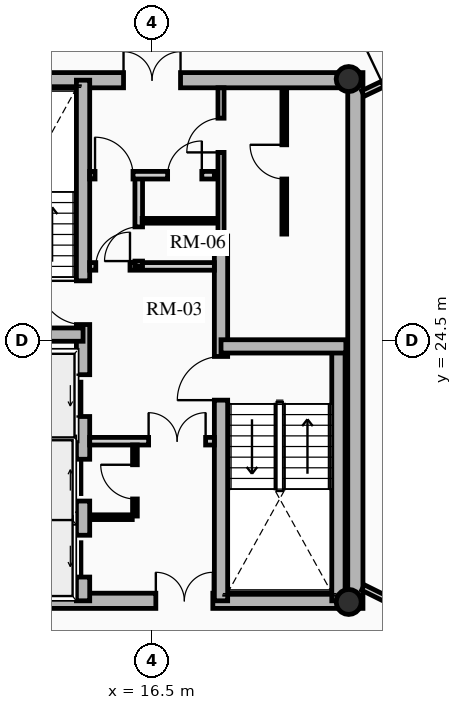
"""IFC4 building model, lengths in metres.
Left out: names, types, materials, properties, quantities, classifications, styles, units other than length and angle.
Written with IfcOpenShell. Run it as: python <this file> out.ifc"""

import sys

from ifc_helpers import new_model, si_unit, direction, frame, frame_2d, origin, origin_2d, place, context, subcontext, project, spatial, rectangle, hollow_circle, extrude, source, transform, mapped, element, fill, save


model = new_model("IFC4")
c1 = context("Model", 3, precision=1e-05, world=origin(), true_north=direction((0.0, 1.0)))
c2 = subcontext(c1, "Body", "Model", "MODEL_VIEW")
j1 = project(units=[si_unit("LENGTHUNIT", "METRE"), si_unit("PLANEANGLEUNIT", "RADIAN")], contexts=[c1])
p1 = place(None, origin())
s1 = spatial("IfcSite", under=j1, at=p1, CompositionType="ELEMENT")
p2 = place(p1, origin())
s2 = spatial("IfcBuilding", under=s1, at=p2, CompositionType="ELEMENT")
p3 = place(p2, frame((0.0, 0.0, 226.05)))
s3 = spatial("IfcBuildingStorey", under=s2, at=p3, CompositionType="ELEMENT", Elevation=226.05)
p4 = place(p3, frame((21.85, 17.45, 0.0), z_axis=(0.0, 0.0, 1.0), x_axis=(0.0, 1.0, 0.0)))
e1 = element("IfcWall", 1, at=p4, inside=s3, PredefinedType="SHEAR", context=c2, shape_type="SweptSolid", body=[
    extrude(rectangle(XDim=14.1, YDim=0.4, at=frame_2d((7.05, 0.0))), origin(), (0.0, 0.0, 1.0), 3.2),
])
p5 = place(p3, frame((11.15, 17.65, 0.0), z_axis=(0.0, 0.0, 1.0), x_axis=(1.0, 0.0, 0.0)))
e2 = element("IfcWall", 2, at=p5, inside=s3, PredefinedType="SHEAR", context=c2, shape_type="SweptSolid", body=[
    extrude(rectangle(XDim=10.7, YDim=0.4, at=frame_2d((5.35, 0.0))), origin(), (0.0, 0.0, 1.0), 3.2),
])
m1 = source(origin(), c2, "Body", "SweptSolid", [
    extrude(rectangle(XDim=1.5, YDim=2.02, at=frame_2d((0.75, 1.01))), frame((0.0, 0.21, 0.0), z_axis=(0.0, -1.0, 0.0), x_axis=(1.0, 0.0, 0.0)), (0.0, 0.0, 1.0), 0.42),
])
p6 = place(p5, frame((5.45, 0.0, 0.0)))
e3 = element("IfcOpeningElement", 3, at=p6, cuts=e2, PredefinedType="OPENING", context=c2, shape_type="MappedRepresentation", body=[
    mapped(m1, transform((0.0, 0.0, 0.0), x_axis=(1.0, 0.0, 0.0), y_axis=(0.0, 1.0, 0.0), z_axis=(0.0, 0.0, 1.0), scale=1.0)),
])
p7 = place(p3, frame((11.15, 31.35, 0.0), z_axis=(0.0, 0.0, 1.0), x_axis=(1.0, 0.0, 0.0)))
e4 = element("IfcWall", 4, at=p7, inside=s3, PredefinedType="SHEAR", context=c2, shape_type="SweptSolid", body=[
    extrude(rectangle(XDim=10.7, YDim=0.4, at=frame_2d((5.35, 0.0))), origin(), (0.0, 0.0, 1.0), 3.2),
])
p8 = place(p7, frame((4.6, 0.0, 0.0)))
e5 = element("IfcOpeningElement", 5, at=p8, cuts=e4, PredefinedType="OPENING", context=c2, shape_type="MappedRepresentation", body=[
    mapped(m1, transform((0.0, 0.0, 0.0), x_axis=(1.0, 0.0, 0.0), y_axis=(0.0, 1.0, 0.0), z_axis=(0.0, 0.0, 1.0), scale=1.0)),
])
p9 = place(p3, frame((14.685, 17.65, 0.0), z_axis=(0.0, 0.0, 1.0), x_axis=(0.0, 1.0, 0.0)))
e6 = element("IfcWall", 6, at=p9, inside=s3, PredefinedType="SHEAR", context=c2, shape_type="SweptSolid", body=[
    extrude(rectangle(XDim=13.7, YDim=0.35, at=frame_2d((6.85, 0.0))), origin(), (0.0, 0.0, 1.0), 3.2),
])
m2 = source(origin(), c2, "Body", "SweptSolid", [
    extrude(rectangle(XDim=1.1, YDim=2.015, at=frame_2d((0.55, 1.007))), frame((0.0, 0.185, 0.0), z_axis=(0.0, -1.0, 0.0), x_axis=(1.0, 0.0, 0.0)), (0.0, 0.0, 1.0), 0.37),
])
p10 = place(p9, frame((4.85, 0.0, 0.0)))
e7 = element("IfcOpeningElement", 7, at=p10, cuts=e6, PredefinedType="OPENING", context=c2, shape_type="MappedRepresentation", body=[
    mapped(m2, transform((0.0, 0.0, 0.0), x_axis=(1.0, 0.0, 0.0), y_axis=(0.0, 1.0, 0.0), z_axis=(0.0, 0.0, 1.0), scale=1.0)),
])
p11 = place(p9, frame((0.625, 0.0, 0.0)))
e8 = element("IfcOpeningElement", 8, at=p11, cuts=e6, PredefinedType="OPENING", context=c2, shape_type="MappedRepresentation", body=[
    mapped(m2, transform((0.0, 0.0, 0.0), x_axis=(1.0, 0.0, 0.0), y_axis=(0.0, 1.0, 0.0), z_axis=(0.0, 0.0, 1.0), scale=1.0)),
])
p12 = place(p9, frame((2.625, 0.0, 0.0)))
e9 = element("IfcOpeningElement", 9, at=p12, cuts=e6, PredefinedType="OPENING", context=c2, shape_type="MappedRepresentation", body=[
    mapped(m2, transform((0.0, 0.0, 0.0), x_axis=(1.0, 0.0, 0.0), y_axis=(0.0, 1.0, 0.0), z_axis=(0.0, 0.0, 1.0), scale=1.0)),
])
m3 = source(origin(), c2, "Body", "SweptSolid", [
    extrude(rectangle(XDim=1.15, YDim=2.02, at=frame_2d((0.575, 1.01))), frame((0.0, 0.185, 0.0), z_axis=(0.0, -1.0, 0.0), x_axis=(1.0, 0.0, 0.0)), (0.0, 0.0, 1.0), 0.37),
])
p13 = place(p9, frame((7.27, 0.0, 0.0)))
e10 = element("IfcOpeningElement", 10, at=p13, cuts=e6, PredefinedType="OPENING", context=c2, shape_type="MappedRepresentation", body=[
    mapped(m3, transform((0.0, 0.0, 0.0), x_axis=(1.0, 0.0, 0.0), y_axis=(0.0, 1.0, 0.0), z_axis=(0.0, 0.0, 1.0), scale=1.0)),
])
p14 = place(p3, frame((18.315, 17.65, 0.0), z_axis=(0.0, 0.0, 1.0), x_axis=(0.0, 1.0, 0.0)))
e11 = element("IfcWall", 11, at=p14, inside=s3, PredefinedType="SHEAR", context=c2, shape_type="SweptSolid", body=[
    extrude(rectangle(XDim=9.6, YDim=0.35, at=frame_2d((4.8, 0.0))), origin(), (0.0, 0.0, 1.0), 3.2),
])
p15 = place(p14, frame((5.28, 0.0, 0.0)))
e12 = element("IfcOpeningElement", 12, at=p15, cuts=e11, PredefinedType="OPENING", context=c2, shape_type="MappedRepresentation", body=[
    mapped(m3, transform((0.0, 0.0, 0.0), x_axis=(1.0, 0.0, 0.0), y_axis=(0.0, 1.0, 0.0), z_axis=(0.0, 0.0, 1.0), scale=1.0)),
])
p16 = place(p3, frame((11.4, 24.655, 0.0), z_axis=(0.0, 0.0, 1.0), x_axis=(1.0, 0.0, 0.0)))
e13 = element("IfcWall", 13, at=p16, inside=s3, PredefinedType="SHEAR", context=c2, shape_type="SweptSolid", body=[
    extrude(rectangle(XDim=3.285, YDim=0.35, at=frame_2d((1.643, 0.0))), origin(), (0.0, 0.0, 1.0), 3.2),
])
p17 = place(p3, frame((21.405, 17.65, 0.0), z_axis=(0.0, 0.0, 1.0), x_axis=(0.0, 1.0, 0.0)))
e14 = element("IfcWall", 14, at=p17, inside=s3, PredefinedType="SHEAR", context=c2, shape_type="SweptSolid", body=[
    extrude(rectangle(XDim=6.695, YDim=0.35, at=frame_2d((3.348, 0.0))), origin(), (0.0, 0.0, 1.0), 3.2),
])
p18 = place(p3, frame((18.315, 24.345, 0.0), z_axis=(0.0, 0.0, 1.0), x_axis=(1.0, 0.0, 0.0)))
e15 = element("IfcWall", 15, at=p18, inside=s3, PredefinedType="SHEAR", context=c2, shape_type="SweptSolid", body=[
    extrude(rectangle(XDim=3.285, YDim=0.35, at=frame_2d((1.643, 0.0))), origin(), (0.0, 0.0, 1.0), 3.2),
])
for number, where, z_axis, x_axis in (
    (16, (21.675, 17.62, 0.0), (0.0, 0.0, 1.0), (1.0, 0.0, 0.0)),
    (17, (21.675, 31.38, 0.0), (0.0, 0.0, 1.0), (1.0, 0.0, 0.0)),
):
    element("IfcColumn", number, at=place(p3, frame(where, z_axis=z_axis, x_axis=x_axis)), inside=s3, PredefinedType="COLUMN", context=c2, shape_type="SweptSolid", body=[
        extrude(hollow_circle(Radius=0.33, WallThickness=0.025, at=origin_2d()), origin(), (0.0, 0.0, 1.0), 3.2),
    ])
for number, where, z_axis, x_axis in (
    (18, (11.52, 21.8, 0.0), (0.0, 0.0, 1.0), (1.0, 0.0, 0.0)),
    (19, (11.52, 19.825, 0.0), (0.0, 0.0, 1.0), (1.0, 0.0, 0.0)),
):
    element("IfcWall", number, at=place(p3, frame(where, z_axis=z_axis, x_axis=x_axis)), inside=s3, PredefinedType="SHEAR", context=c2, shape_type="SweptSolid", body=[
        extrude(rectangle(XDim=2.97, YDim=0.2, at=frame_2d((1.485, 0.0))), origin(), (0.0, 0.0, 1.0), 3.2),
    ])
p19 = place(p3, frame((14.86, 21.85, 0.0), z_axis=(0.0, 0.0, 1.0), x_axis=(1.0, 0.0, 0.0)))
e20 = element("IfcWall", 20, at=p19, inside=s3, PredefinedType="PARTITIONING", context=c2, shape_type="SweptSolid", body=[
    extrude(rectangle(XDim=3.28, YDim=0.2, at=frame_2d((1.64, 0.0))), origin(), (0.0, 0.0, 1.0), 2.975),
])
m4 = source(origin(), c2, "Body", "SweptSolid", [
    extrude(rectangle(XDim=1.5, YDim=2.02, at=frame_2d((0.75, 1.01))), frame((0.0, 0.11, 0.0), z_axis=(0.0, -1.0, 0.0), x_axis=(1.0, 0.0, 0.0)), (0.0, 0.0, 1.0), 0.22),
])
p20 = place(p19, frame((1.55, 0.0, 0.0)))
e21 = element("IfcOpeningElement", 21, at=p20, cuts=e20, PredefinedType="OPENING", context=c2, shape_type="MappedRepresentation", body=[
    mapped(m4, transform((0.0, 0.0, 0.0), x_axis=(1.0, 0.0, 0.0), y_axis=(0.0, 1.0, 0.0), z_axis=(0.0, 0.0, 1.0), scale=1.0)),
])
p21 = place(p3, frame((14.86, 26.45, 0.0), z_axis=(0.0, 0.0, 1.0), x_axis=(1.0, 0.0, 0.0)))
e22 = element("IfcWall", 22, at=p21, inside=s3, PredefinedType="PARTITIONING", context=c2, shape_type="SweptSolid", body=[
    extrude(rectangle(XDim=3.28, YDim=0.2, at=frame_2d((1.64, 0.0))), origin(), (0.0, 0.0, 1.0), 2.975),
])
m5 = source(origin(), c2, "Body", "SweptSolid", [
    extrude(rectangle(XDim=0.9, YDim=2.005, at=frame_2d((0.45, 1.002))), frame((0.0, 0.11, 0.0), z_axis=(0.0, -1.0, 0.0), x_axis=(1.0, 0.0, 0.0)), (0.0, 0.0, 1.0), 0.22),
])
p22 = place(p21, frame((0.16, 0.0, 0.0)))
e23 = element("IfcOpeningElement", 23, at=p22, cuts=e22, PredefinedType="OPENING", context=c2, shape_type="MappedRepresentation", body=[
    mapped(m5, transform((0.0, 0.0, 0.0), x_axis=(1.0, 0.0, 0.0), y_axis=(0.0, 1.0, 0.0), z_axis=(0.0, 0.0, 1.0), scale=1.0)),
])
p23 = place(p3, frame((16.15, 26.45, 0.0), z_axis=(0.0, 0.0, 1.0), x_axis=(0.0, 1.0, 0.0)))
e24 = element("IfcWall", 24, at=p23, inside=s3, PredefinedType="PARTITIONING", context=c2, shape_type="SweptSolid", body=[
    extrude(rectangle(XDim=2.4, YDim=0.2, at=frame_2d((1.2, 0.0))), origin(), (0.0, 0.0, 1.0), 2.975),
])
p24 = place(p23, frame((0.14, 0.0, 0.0)))
e25 = element("IfcOpeningElement", 25, at=p24, cuts=e24, PredefinedType="OPENING", context=c2, shape_type="MappedRepresentation", body=[
    mapped(m5, transform((0.0, 0.0, 0.0), x_axis=(1.0, 0.0, 0.0), y_axis=(0.0, 1.0, 0.0), z_axis=(0.0, 0.0, 1.0), scale=1.0)),
])
p25 = place(p3, frame((14.86, 28.85, 0.0), z_axis=(0.0, 0.0, 1.0), x_axis=(1.0, 0.0, 0.0)))
e26 = element("IfcWall", 26, at=p25, inside=s3, PredefinedType="PARTITIONING", context=c2, shape_type="SweptSolid", body=[
    extrude(rectangle(XDim=3.28, YDim=0.2, at=frame_2d((1.64, 0.0))), origin(), (0.0, 0.0, 1.0), 2.975),
])
m6 = source(origin(), c2, "Body", "SweptSolid", [
    extrude(rectangle(XDim=1.0, YDim=2.015, at=frame_2d((0.5, 1.007))), frame((0.0, 0.11, 0.0), z_axis=(0.0, -1.0, 0.0), x_axis=(1.0, 0.0, 0.0)), (0.0, 0.0, 1.0), 0.22),
])
p26 = place(p25, frame((0.14, 0.0, 0.0)))
e27 = element("IfcOpeningElement", 27, at=p26, cuts=e26, PredefinedType="OPENING", context=c2, shape_type="MappedRepresentation", body=[
    mapped(m6, transform((0.0, 0.0, 0.0), x_axis=(1.0, 0.0, 0.0), y_axis=(0.0, 1.0, 0.0), z_axis=(0.0, 0.0, 1.0), scale=1.0)),
])
p27 = place(p25, frame((2.05, 0.0, 0.0)))
e28 = element("IfcOpeningElement", 28, at=p27, cuts=e26, PredefinedType="OPENING", context=c2, shape_type="MappedRepresentation", body=[
    mapped(m5, transform((0.0, 0.0, 0.0), x_axis=(1.0, 0.0, 0.0), y_axis=(0.0, 1.0, 0.0), z_axis=(0.0, 0.0, 1.0), scale=1.0)),
])
p28 = place(p3, frame((16.05, 19.88, 0.0), z_axis=(0.0, 0.0, 1.0), x_axis=(0.0, 1.0, 0.0)))
e29 = element("IfcWall", 29, at=p28, inside=s3, PredefinedType="PARTITIONING", context=c2, shape_type="SweptSolid", body=[
    extrude(rectangle(XDim=1.87, YDim=0.125, at=frame_2d((0.935, 0.0))), origin(), (0.0, 0.0, 1.0), 2.975),
])
m7 = source(origin(), c2, "Body", "SweptSolid", [
    extrude(rectangle(XDim=0.9, YDim=2.005, at=frame_2d((0.45, 1.002))), frame((0.0, 0.073, 0.0), z_axis=(0.0, -1.0, 0.0), x_axis=(1.0, 0.0, 0.0)), (0.0, 0.0, 1.0), 0.145),
])
p29 = place(p28, frame((0.45, 0.0, 0.0)))
e30 = element("IfcOpeningElement", 30, at=p29, cuts=e29, PredefinedType="OPENING", context=c2, shape_type="MappedRepresentation", body=[
    mapped(m7, transform((0.0, 0.0, 0.0), x_axis=(1.0, 0.0, 0.0), y_axis=(0.0, 1.0, 0.0), z_axis=(0.0, 0.0, 1.0), scale=1.0)),
])
p30 = place(p3, frame((14.88, 19.85, 0.0), z_axis=(0.0, 0.0, 1.0), x_axis=(1.0, 0.0, 0.0)))
e31 = element("IfcWall", 31, at=p30, inside=s3, PredefinedType="PARTITIONING", context=c2, shape_type="SweptSolid", body=[
    extrude(rectangle(XDim=1.1, YDim=0.125, at=frame_2d((0.55, 0.0))), origin(), (0.0, 0.0, 1.0), 2.975),
])
p31 = place(p3, frame((16.24, 27.65, 0.0), z_axis=(0.0, 0.0, 1.0), x_axis=(1.0, 0.0, 0.0)))
e32 = element("IfcWall", 32, at=p31, inside=s3, PredefinedType="PARTITIONING", context=c2, shape_type="SweptSolid", body=[
    extrude(rectangle(XDim=1.88, YDim=0.125, at=frame_2d((0.94, 0.0))), origin(), (0.0, 0.0, 1.0), 2.975),
])
p32 = place(p3, frame((18.315, 27.25, 0.0), z_axis=(0.0, 0.0, 1.0), x_axis=(0.0, 1.0, 0.0)))
e33 = element("IfcWall", 33, at=p32, inside=s3, PredefinedType="PARTITIONING", context=c2, shape_type="SweptSolid", body=[
    extrude(rectangle(XDim=3.9, YDim=0.16, at=frame_2d((1.95, 0.0))), origin(), (0.0, 0.0, 1.0), 2.975),
])
m8 = source(origin(), c2, "Body", "SweptSolid", [
    extrude(rectangle(XDim=0.9, YDim=2.005, at=frame_2d((0.45, 1.002))), frame((0.0, 0.09, 0.0), z_axis=(0.0, -1.0, 0.0), x_axis=(1.0, 0.0, 0.0)), (0.0, 0.0, 1.0), 0.18),
])
p33 = place(p32, frame((2.2, 0.0, 0.0)))
e34 = element("IfcOpeningElement", 34, at=p33, cuts=e33, PredefinedType="OPENING", context=c2, shape_type="MappedRepresentation", body=[
    mapped(m8, transform((0.0, 0.0, 0.0), x_axis=(1.0, 0.0, 0.0), y_axis=(0.0, 1.0, 0.0), z_axis=(0.0, 0.0, 1.0), scale=1.0)),
])
p34 = place(p3, frame((19.98, 27.3, 0.0), z_axis=(0.0, 0.0, 1.0), x_axis=(0.0, 1.0, 0.0)))
e35 = element("IfcWall", 35, at=p34, inside=s3, PredefinedType="PARTITIONING", context=c2, shape_type="SweptSolid", body=[
    extrude(rectangle(XDim=3.82, YDim=0.125, at=frame_2d((1.91, 0.0))), origin(), (0.0, 0.0, 1.0), 2.975),
])
p35 = place(p34, frame((1.45, 0.0, 0.0)))
e36 = element("IfcOpeningElement", 36, at=p35, cuts=e35, PredefinedType="OPENING", context=c2, shape_type="MappedRepresentation", body=[
    mapped(m7, transform((0.0, 0.0, 0.0), x_axis=(1.0, 0.0, 0.0), y_axis=(0.0, 1.0, 0.0), z_axis=(0.0, 0.0, 1.0), scale=1.0)),
])
p36 = place(p3, frame((22.05, 31.0, 0.0), z_axis=(0.0, 0.0, 1.0), x_axis=(0.903013459407, 0.429612257891, 0.0)))
e37 = element("IfcWall", 37, at=p36, inside=s3, PredefinedType="PARTITIONING", context=c2, shape_type="SweptSolid", body=[
    extrude(rectangle(XDim=1.829, YDim=0.16, at=frame_2d((0.914, 0.0))), origin(), (0.0, 0.0, 1.0), 2.545),
])
m9 = source(origin(), c2, "Body", "SweptSolid", [
    extrude(rectangle(XDim=1.05, YDim=2.015, at=frame_2d((0.525, 1.007))), frame((0.0, 0.09, 0.0), z_axis=(0.0, -1.0, 0.0), x_axis=(1.0, 0.0, 0.0)), (0.0, 0.0, 1.0), 0.18),
])
p37 = place(p36, frame((0.579, 0.0, 0.0)))
e38 = element("IfcOpeningElement", 38, at=p37, cuts=e37, PredefinedType="OPENING", context=c2, shape_type="MappedRepresentation", body=[
    mapped(m9, transform((0.0, 0.0, 0.0), x_axis=(1.0, 0.0, 0.0), y_axis=(0.0, 1.0, 0.0), z_axis=(0.0, 0.0, 1.0), scale=1.0)),
])
p38 = place(p3, frame((22.05, 18.0, 0.0), z_axis=(0.0, 0.0, 1.0), x_axis=(0.896045848613, -0.443961526692, 0.0)))
e39 = element("IfcWall", 39, at=p38, inside=s3, PredefinedType="PARTITIONING", context=c2, shape_type="SweptSolid", body=[
    extrude(rectangle(XDim=1.924, YDim=0.16, at=frame_2d((0.962, 0.0))), origin(), (0.0, 0.0, 1.0), 2.545),
])
p39 = place(p38, frame((0.674, 0.0, 0.0)))
e40 = element("IfcOpeningElement", 40, at=p39, cuts=e39, PredefinedType="OPENING", context=c2, shape_type="MappedRepresentation", body=[
    mapped(m9, transform((0.0, 0.0, 0.0), x_axis=(1.0, 0.0, 0.0), y_axis=(0.0, 1.0, 0.0), z_axis=(0.0, 0.0, 1.0), scale=1.0)),
])
m10 = source(origin(), c2, "Body", "SweptSolid", [
    extrude(rectangle(XDim=1.1, YDim=2.015, at=frame_2d((0.55, 1.007))), frame((0.0, 0.025, 0.0), z_axis=(0.0, -1.0, 0.0), x_axis=(1.0, 0.0, 0.0)), (0.0, 0.0, 1.0), 0.05),
])
p40 = place(p10, origin())
e41 = element("IfcDoor", 41, at=p40, inside=s3, OperationType="SLIDING_TO_LEFT", PredefinedType="DOOR", context=c2, shape_type="MappedRepresentation", body=[
    mapped(m10, transform((0.0, 0.0, 0.0), x_axis=(1.0, 0.0, 0.0), y_axis=(0.0, 1.0, 0.0), z_axis=(0.0, 0.0, 1.0), scale=1.0)),
])
fill(e7, e41)
p41 = place(p11, origin())
e42 = element("IfcDoor", 42, at=p41, inside=s3, OperationType="SLIDING_TO_LEFT", PredefinedType="DOOR", context=c2, shape_type="MappedRepresentation", body=[
    mapped(m10, transform((0.0, 0.0, 0.0), x_axis=(1.0, 0.0, 0.0), y_axis=(0.0, 1.0, 0.0), z_axis=(0.0, 0.0, 1.0), scale=1.0)),
])
fill(e8, e42)
p42 = place(p12, origin())
e43 = element("IfcDoor", 43, at=p42, inside=s3, OperationType="SLIDING_TO_RIGHT", PredefinedType="DOOR", context=c2, shape_type="MappedRepresentation", body=[
    mapped(m10, transform((0.0, 0.0, 0.0), x_axis=(1.0, 0.0, 0.0), y_axis=(0.0, 1.0, 0.0), z_axis=(0.0, 0.0, 1.0), scale=1.0)),
])
fill(e9, e43)
m11 = source(origin(), c2, "Body", "SweptSolid", [
    extrude(rectangle(XDim=1.15, YDim=2.02, at=frame_2d((0.575, 1.01))), frame((0.0, 0.025, 0.0), z_axis=(0.0, -1.0, 0.0), x_axis=(1.0, 0.0, 0.0)), (0.0, 0.0, 1.0), 0.05),
])
p43 = place(p13, origin())
e44 = element("IfcDoor", 44, at=p43, inside=s3, OperationType="SINGLE_SWING_RIGHT", PredefinedType="DOOR", context=c2, shape_type="MappedRepresentation", body=[
    mapped(m11, transform((0.0, 0.0, 0.0), x_axis=(1.0, 0.0, 0.0), y_axis=(0.0, 1.0, 0.0), z_axis=(0.0, 0.0, 1.0), scale=1.0)),
])
fill(e10, e44)
p44 = place(p15, origin())
e45 = element("IfcDoor", 45, at=p44, inside=s3, OperationType="SINGLE_SWING_LEFT", PredefinedType="DOOR", context=c2, shape_type="MappedRepresentation", body=[
    mapped(m11, transform((0.0, 0.0, 0.0), x_axis=(1.0, 0.0, 0.0), y_axis=(0.0, 1.0, 0.0), z_axis=(0.0, 0.0, 1.0), scale=1.0)),
])
fill(e12, e45)
m12 = source(origin(), c2, "Body", "SweptSolid", [
    extrude(rectangle(XDim=1.5, YDim=2.02, at=frame_2d((0.75, 1.01))), frame((0.0, 0.025, 0.0), z_axis=(0.0, -1.0, 0.0), x_axis=(1.0, 0.0, 0.0)), (0.0, 0.0, 1.0), 0.05),
])
p45 = place(p8, origin())
e46 = element("IfcDoor", 46, at=p45, inside=s3, OperationType="DOUBLE_DOOR_SINGLE_SWING", PredefinedType="DOOR", context=c2, shape_type="MappedRepresentation", body=[
    mapped(m12, transform((0.0, 0.0, 0.0), x_axis=(1.0, 0.0, 0.0), y_axis=(0.0, 1.0, 0.0), z_axis=(0.0, 0.0, 1.0), scale=1.0)),
])
fill(e5, e46)
p46 = place(p6, origin())
e47 = element("IfcDoor", 47, at=p46, inside=s3, OperationType="DOUBLE_DOOR_SINGLE_SWING", PredefinedType="DOOR", context=c2, shape_type="MappedRepresentation", body=[
    mapped(m12, transform((0.0, 0.0, 0.0), x_axis=(1.0, 0.0, 0.0), y_axis=(0.0, 1.0, 0.0), z_axis=(0.0, 0.0, 1.0), scale=1.0)),
])
fill(e3, e47)
p47 = place(p20, origin())
e48 = element("IfcDoor", 48, at=p47, inside=s3, OperationType="DOUBLE_DOOR_SINGLE_SWING", PredefinedType="DOOR", context=c2, shape_type="MappedRepresentation", body=[
    mapped(m12, transform((0.0, 0.0, 0.0), x_axis=(1.0, 0.0, 0.0), y_axis=(0.0, 1.0, 0.0), z_axis=(0.0, 0.0, 1.0), scale=1.0)),
])
fill(e21, e48)
m13 = source(origin(), c2, "Body", "SweptSolid", [
    extrude(rectangle(XDim=0.9, YDim=2.005, at=frame_2d((0.45, 1.002))), frame((0.0, 0.025, 0.0), z_axis=(0.0, -1.0, 0.0), x_axis=(1.0, 0.0, 0.0)), (0.0, 0.0, 1.0), 0.05),
])
p48 = place(p22, origin())
e49 = element("IfcDoor", 49, at=p48, inside=s3, OperationType="SINGLE_SWING_RIGHT", PredefinedType="DOOR", context=c2, shape_type="MappedRepresentation", body=[
    mapped(m13, transform((0.0, 0.0, 0.0), x_axis=(1.0, 0.0, 0.0), y_axis=(0.0, 1.0, 0.0), z_axis=(0.0, 0.0, 1.0), scale=1.0)),
])
fill(e23, e49)
m14 = source(origin(), c2, "Body", "SweptSolid", [
    extrude(rectangle(XDim=1.0, YDim=2.015, at=frame_2d((0.5, 1.007))), frame((0.0, 0.025, 0.0), z_axis=(0.0, -1.0, 0.0), x_axis=(1.0, 0.0, 0.0)), (0.0, 0.0, 1.0), 0.05),
])
p49 = place(p26, origin())
e50 = element("IfcDoor", 50, at=p49, inside=s3, OperationType="SINGLE_SWING_LEFT", PredefinedType="DOOR", context=c2, shape_type="MappedRepresentation", body=[
    mapped(m14, transform((0.0, 0.0, 0.0), x_axis=(1.0, 0.0, 0.0), y_axis=(0.0, 1.0, 0.0), z_axis=(0.0, 0.0, 1.0), scale=1.0)),
])
fill(e27, e50)
p50 = place(p29, origin())
e51 = element("IfcDoor", 51, at=p50, inside=s3, OperationType="SINGLE_SWING_RIGHT", PredefinedType="DOOR", context=c2, shape_type="MappedRepresentation", body=[
    mapped(m13, transform((0.0, 0.0, 0.0), x_axis=(1.0, 0.0, 0.0), y_axis=(0.0, 1.0, 0.0), z_axis=(0.0, 0.0, 1.0), scale=1.0)),
])
fill(e30, e51)
p51 = place(p24, origin())
e52 = element("IfcDoor", 52, at=p51, inside=s3, OperationType="SINGLE_SWING_LEFT", PredefinedType="DOOR", context=c2, shape_type="MappedRepresentation", body=[
    mapped(m13, transform((0.0, 0.0, 0.0), x_axis=(1.0, 0.0, 0.0), y_axis=(0.0, 1.0, 0.0), z_axis=(0.0, 0.0, 1.0), scale=1.0)),
])
fill(e25, e52)
p52 = place(p27, origin())
e53 = element("IfcDoor", 53, at=p52, inside=s3, OperationType="SINGLE_SWING_RIGHT", PredefinedType="DOOR", context=c2, shape_type="MappedRepresentation", body=[
    mapped(m13, transform((0.0, 0.0, 0.0), x_axis=(1.0, 0.0, 0.0), y_axis=(0.0, 1.0, 0.0), z_axis=(0.0, 0.0, 1.0), scale=1.0)),
])
fill(e28, e53)
p53 = place(p33, origin())
e54 = element("IfcDoor", 54, at=p53, inside=s3, OperationType="SINGLE_SWING_LEFT", PredefinedType="DOOR", context=c2, shape_type="MappedRepresentation", body=[
    mapped(m13, transform((0.0, 0.0, 0.0), x_axis=(1.0, 0.0, 0.0), y_axis=(0.0, 1.0, 0.0), z_axis=(0.0, 0.0, 1.0), scale=1.0)),
])
fill(e34, e54)
p54 = place(p35, origin())
e55 = element("IfcDoor", 55, at=p54, inside=s3, OperationType="SINGLE_SWING_RIGHT", PredefinedType="DOOR", context=c2, shape_type="MappedRepresentation", body=[
    mapped(m13, transform((0.0, 0.0, 0.0), x_axis=(1.0, 0.0, 0.0), y_axis=(0.0, 1.0, 0.0), z_axis=(0.0, 0.0, 1.0), scale=1.0)),
])
fill(e36, e55)
save(model, sys.argv[1])
